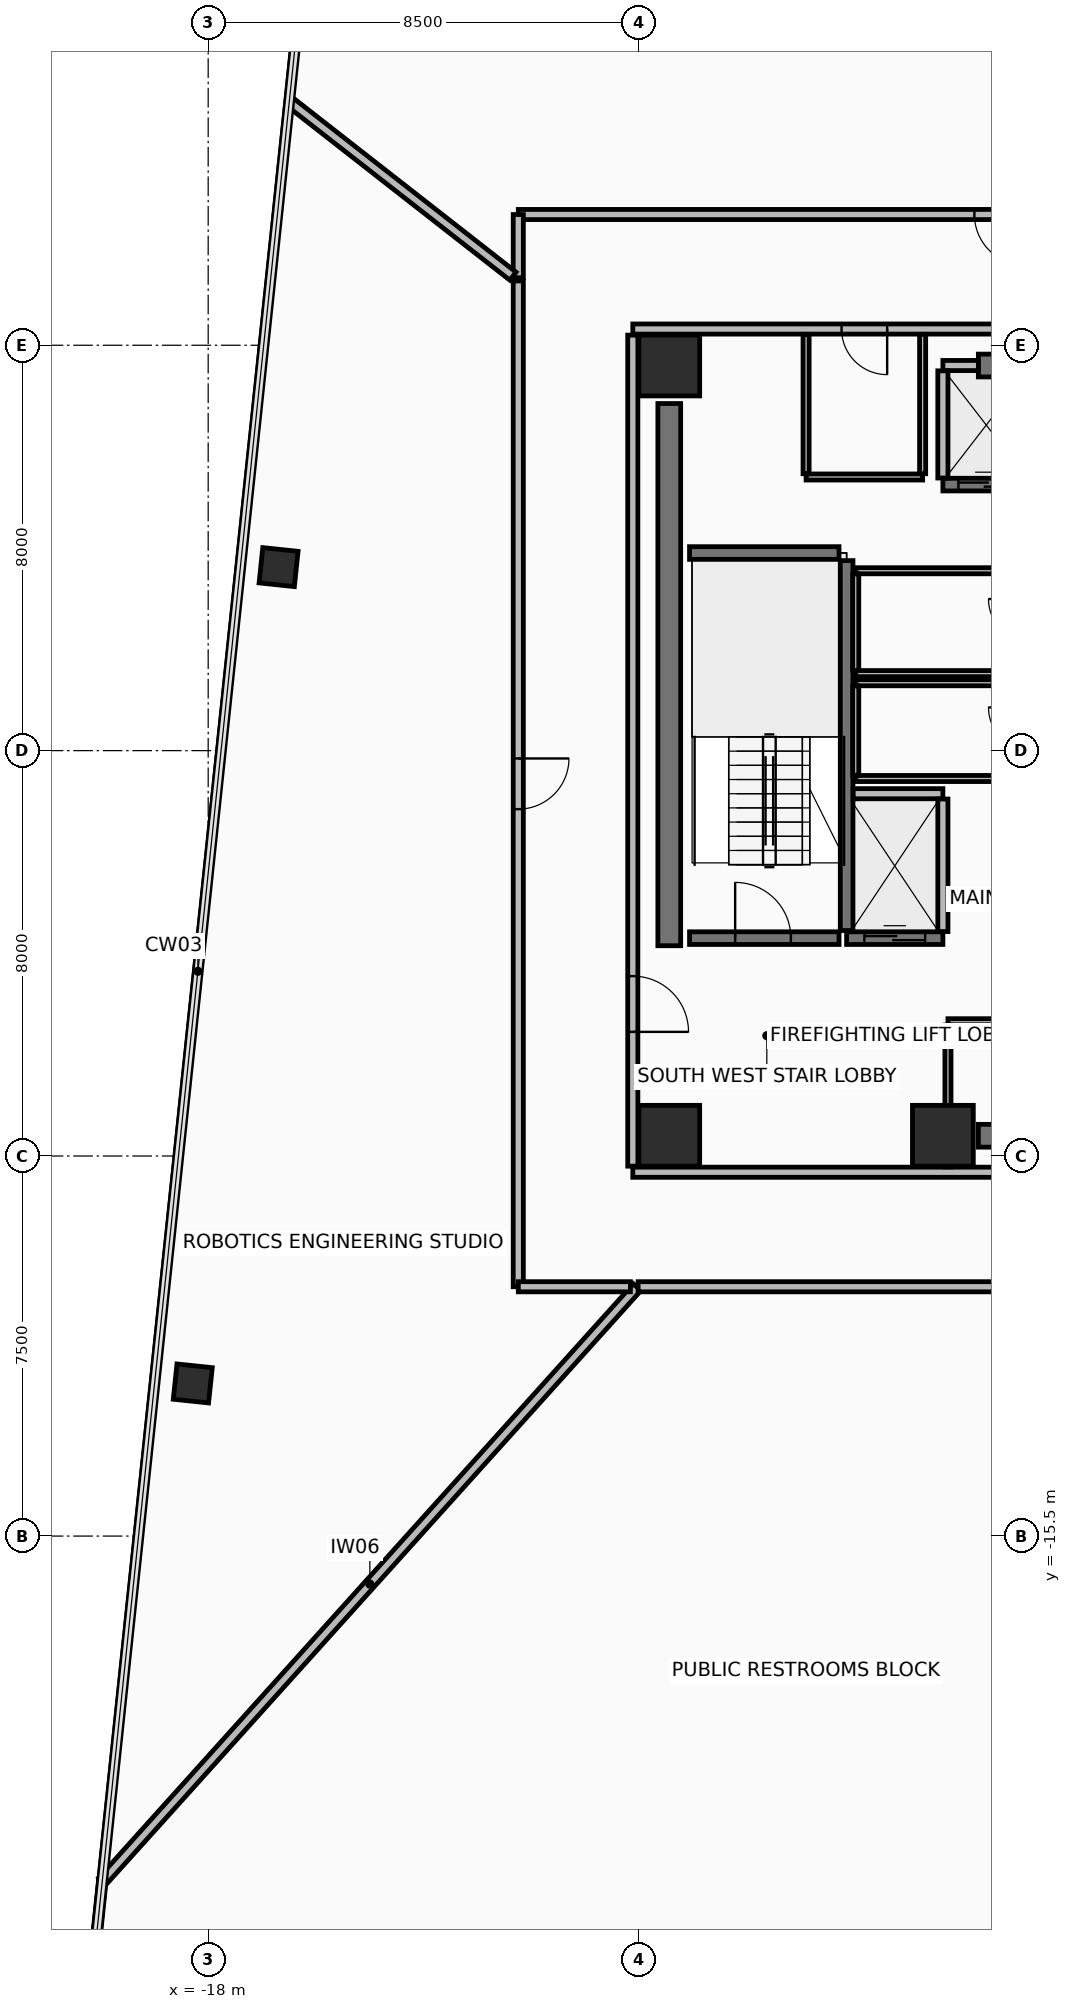
"""IFC4 building model, lengths in metres.
Left out: names, types, materials, properties, quantities, classifications, styles, units other than length and angle.
Written with IfcOpenShell. Run it as: python <this file> out.ifc"""

import sys

from ifc_helpers import new_model, si_unit, direction, frame, frame_2d, origin, origin_2d, place, context, subcontext, project, spatial, rectangle, hollow_rectangle, extrude, element, fill, save


model = new_model("IFC4")
c1 = context("Model", 3, precision=1e-05, world=origin(), true_north=direction((0.0, 1.0)))
c2 = subcontext(c1, "Body", "Model", "MODEL_VIEW")
j1 = project(units=[si_unit("LENGTHUNIT", "METRE"), si_unit("PLANEANGLEUNIT", "RADIAN")], contexts=[c1])
p1 = place(None, origin())
s1 = spatial("IfcSite", under=j1, at=p1, CompositionType="ELEMENT")
p2 = place(p1, origin())
s2 = spatial("IfcBuilding", under=s1, at=p2, CompositionType="ELEMENT")
p3 = place(p2, frame((0.0, 0.0, 123.25)))
s3 = spatial("IfcBuildingStorey", under=s2, at=p3, CompositionType="ELEMENT", Elevation=123.25)
for number, where, z_axis, x_axis in (
    (1, (-8.9, -7.6, 0.0), (0.0, 0.0, 1.0), (1.0, 0.0, 0.0)),
    (2, (-3.5, -7.6, 0.0), (0.0, 0.0, 1.0), (1.0, 0.0, 0.0)),
    (3, (-8.9, 7.6, 0.0), (0.0, 0.0, 1.0), (1.0, 0.0, 0.0)),
):
    element("IfcColumn", number, at=place(p3, frame(where, z_axis=z_axis, x_axis=x_axis)), inside=s3, PredefinedType="COLUMN", context=c2, shape_type="SweptSolid", body=[
        extrude(rectangle(XDim=1.2, YDim=1.2, at=origin_2d()), origin(), (0.0, 0.0, 1.0), 3.6),
    ])
for number, where, z_axis, x_axis in (
    (4, (-16.611, 3.622, 0.0), (0.0, 0.0, 1.0), (0.105, 0.995, 0.0)),
    (5, (-18.304, -12.488, 0.0), (0.0, 0.0, 1.0), (0.105, 0.995, 0.0)),
):
    element("IfcColumn", number, at=place(p3, frame(where, z_axis=z_axis, x_axis=x_axis)), inside=s3, PredefinedType="COLUMN", context=c2, shape_type="SweptSolid", body=[
        extrude(hollow_rectangle(XDim=0.7, YDim=0.7, WallThickness=0.04, at=origin_2d()), origin(), (0.0, 0.0, 1.0), 3.6),
    ])
for number, where, z_axis, x_axis in (
    (6, (-2.8, -7.6, 0.0), (0.0, 0.0, 1.0), (1.0, 0.0, 0.0)),
    (7, (-2.8, 7.6, 0.0), (0.0, 0.0, 1.0), (1.0, 0.0, 0.0)),
):
    element("IfcWall", number, at=place(p3, frame(where, z_axis=z_axis, x_axis=x_axis)), inside=s3, PredefinedType="SHEAR", context=c2, shape_type="SweptSolid", body=[
        extrude(rectangle(XDim=5.38, YDim=0.45, at=frame_2d((2.69, 0.0))), origin(), (0.0, 0.0, 1.0), 3.41),
    ])
p4 = place(p3, frame((-8.9, -3.85, 0.0), z_axis=(0.0, 0.0, 1.0), x_axis=(0.0, 1.0, 0.0)))
e8 = element("IfcWall", 8, at=p4, inside=s3, PredefinedType="SHEAR", context=c2, shape_type="SweptSolid", body=[
    extrude(rectangle(XDim=10.7, YDim=0.45, at=frame_2d((5.35, 0.0))), origin(), (0.0, 0.0, 1.0), 3.41),
])
p5 = place(p3, frame((-9.62, -8.32, 0.0), z_axis=(0.0, 0.0, 1.0), x_axis=(1.0, 0.0, 0.0)))
e9 = element("IfcWall", 9, at=p5, inside=s3, PredefinedType="PARTITIONING", context=c2, shape_type="SweptSolid", body=[
    extrude(rectangle(XDim=19.24, YDim=0.2, at=frame_2d((9.62, 0.0))), origin(), (0.0, 0.0, 1.0), 2.855),
])
p6 = place(p5, frame((8.57, 0.0, 0.0)))
e10 = element("IfcOpeningElement", 10, at=p6, cuts=e9, PredefinedType="OPENING", context=c2, shape_type="SweptSolid", body=[
    extrude(rectangle(XDim=0.9, YDim=2.1, at=frame_2d((0.45, 1.05))), frame((0.0, 0.11, 0.0), z_axis=(0.0, -1.0, 0.0), x_axis=(1.0, 0.0, 0.0)), (0.0, 0.0, 1.0), 0.22),
])
p7 = place(p5, frame((15.02, 0.0, 0.0)))
e11 = element("IfcOpeningElement", 11, at=p7, cuts=e9, PredefinedType="OPENING", context=c2, shape_type="SweptSolid", body=[
    extrude(rectangle(XDim=0.9, YDim=2.1, at=frame_2d((0.45, 1.05))), frame((0.0, 0.11, 0.0), z_axis=(0.0, -1.0, 0.0), x_axis=(1.0, 0.0, 0.0)), (0.0, 0.0, 1.0), 0.22),
])
p8 = place(p3, frame((9.62, 8.32, 0.0), z_axis=(0.0, 0.0, 1.0), x_axis=(-1.0, 0.0, 0.0)))
e12 = element("IfcWall", 12, at=p8, inside=s3, PredefinedType="PARTITIONING", context=c2, shape_type="SweptSolid", body=[
    extrude(rectangle(XDim=19.24, YDim=0.2, at=frame_2d((9.62, 0.0))), origin(), (0.0, 0.0, 1.0), 2.755),
])
p9 = place(p8, frame((14.22, 0.0, 0.0)))
e13 = element("IfcOpeningElement", 13, at=p9, cuts=e12, PredefinedType="OPENING", context=c2, shape_type="SweptSolid", body=[
    extrude(rectangle(XDim=0.9, YDim=2.1, at=frame_2d((0.45, 1.05))), frame((0.0, 0.11, 0.0), z_axis=(0.0, -1.0, 0.0), x_axis=(1.0, 0.0, 0.0)), (0.0, 0.0, 1.0), 0.22),
])
p10 = place(p3, frame((-9.62, 8.2, 0.0), z_axis=(0.0, 0.0, 1.0), x_axis=(0.0, -1.0, 0.0)))
e14 = element("IfcWall", 14, at=p10, inside=s3, PredefinedType="PARTITIONING", context=c2, shape_type="SweptSolid", body=[
    extrude(rectangle(XDim=16.4, YDim=0.2, at=frame_2d((8.2, 0.0))), origin(), (0.0, 0.0, 1.0), 2.855),
])
p11 = place(p10, frame((12.65, 0.0, 0.0)))
e15 = element("IfcOpeningElement", 15, at=p11, cuts=e14, PredefinedType="OPENING", context=c2, shape_type="SweptSolid", body=[
    extrude(rectangle(XDim=1.1, YDim=2.15, at=frame_2d((0.55, 1.075))), frame((0.0, 0.11, 0.0), z_axis=(0.0, -1.0, 0.0), x_axis=(1.0, 0.0, 0.0)), (0.0, 0.0, 1.0), 0.22),
])
p12 = place(p3, frame((-5.4, -3.55, 0.0), z_axis=(0.0, 0.0, 1.0), x_axis=(0.0, 1.0, 0.0)))
e16 = element("IfcWall", 16, at=p12, inside=s3, PredefinedType="SHEAR", context=c2, shape_type="SweptSolid", body=[
    extrude(rectangle(XDim=7.3, YDim=0.25, at=frame_2d((3.65, 0.0))), origin(), (0.0, 0.0, 1.0), 3.41),
])
p13 = place(p3, frame((-8.5, -3.7, 0.0), z_axis=(0.0, 0.0, 1.0), x_axis=(1.0, 0.0, 0.0)))
e17 = element("IfcWall", 17, at=p13, inside=s3, PredefinedType="SHEAR", context=c2, shape_type="SweptSolid", body=[
    extrude(rectangle(XDim=2.95, YDim=0.25, at=frame_2d((1.475, 0.0))), origin(), (0.0, 0.0, 1.0), 3.41),
])
p14 = place(p13, frame((0.9, 0.0, 0.0)))
e18 = element("IfcOpeningElement", 18, at=p14, cuts=e17, PredefinedType="OPENING", context=c2, shape_type="SweptSolid", body=[
    extrude(rectangle(XDim=1.1, YDim=2.15, at=frame_2d((0.55, 1.075))), frame((0.0, 0.135, 0.0), z_axis=(0.0, -1.0, 0.0), x_axis=(1.0, 0.0, 0.0)), (0.0, 0.0, 1.0), 0.27),
])
p15 = place(p3, frame((-8.5, 3.9, 0.0), z_axis=(0.0, 0.0, 1.0), x_axis=(1.0, 0.0, 0.0)))
e19 = element("IfcWall", 19, at=p15, inside=s3, PredefinedType="SHEAR", context=c2, shape_type="SweptSolid", body=[
    extrude(rectangle(XDim=2.95, YDim=0.25, at=frame_2d((1.475, 0.0))), origin(), (0.0, 0.0, 1.0), 3.41),
])
p16 = place(p3, frame((-3.5, 5.25, 0.0), z_axis=(0.0, 0.0, 1.0), x_axis=(1.0, 0.0, 0.0)))
e20 = element("IfcWall", 20, at=p16, inside=s3, PredefinedType="SHEAR", context=c2, shape_type="SweptSolid", body=[
    extrude(rectangle(XDim=1.712, YDim=0.25, at=frame_2d((0.856, 0.0))), origin(), (0.0, 0.0, 1.0), 3.41),
])
p17 = place(p16, frame((0.306, 0.0, 0.0)))
e21 = element("IfcOpeningElement", 21, at=p17, cuts=e20, PredefinedType="OPENING", context=c2, shape_type="SweptSolid", body=[
    extrude(rectangle(XDim=1.1, YDim=2.2, at=frame_2d((0.55, 1.1))), frame((0.0, 0.135, 0.0), z_axis=(0.0, -1.0, 0.0), x_axis=(1.0, 0.0, 0.0)), (0.0, 0.0, 1.0), 0.27),
])
p18 = place(p3, frame((-3.5, 7.6, 0.0), z_axis=(0.0, 0.0, 1.0), x_axis=(1.0, 0.0, 0.0)))
e22 = element("IfcWall", 22, at=p18, inside=s3, PredefinedType="PARTITIONING", context=c2, shape_type="SweptSolid", body=[
    extrude(rectangle(XDim=0.7, YDim=0.2, at=frame_2d((0.35, 0.0))), origin(), (0.0, 0.0, 1.0), 2.605),
])
p19 = place(p3, frame((-3.5, 5.38, 0.0), z_axis=(0.0, 0.0, 1.0), x_axis=(0.0, 1.0, 0.0)))
e23 = element("IfcWall", 23, at=p19, inside=s3, PredefinedType="PARTITIONING", context=c2, shape_type="SweptSolid", body=[
    extrude(rectangle(XDim=2.115, YDim=0.2, at=frame_2d((1.058, 0.0))), origin(), (0.0, 0.0, 1.0), 2.605),
])
p20 = place(p3, frame((-5.4, -3.7, 0.0), z_axis=(0.0, 0.0, 1.0), x_axis=(1.0, 0.0, 0.0)))
e24 = element("IfcWall", 24, at=p20, inside=s3, PredefinedType="SHEAR", context=c2, shape_type="SweptSolid", body=[
    extrude(rectangle(XDim=1.9, YDim=0.25, at=frame_2d((0.95, 0.0))), origin(), (0.0, 0.0, 1.0), 3.41),
])
p21 = place(p20, frame((0.35, 0.0, 0.0)))
e25 = element("IfcOpeningElement", 25, at=p21, cuts=e24, PredefinedType="OPENING", context=c2, shape_type="SweptSolid", body=[
    extrude(rectangle(XDim=1.2, YDim=2.2, at=frame_2d((0.6, 1.1))), frame((0.0, 0.135, 0.0), z_axis=(0.0, -1.0, 0.0), x_axis=(1.0, 0.0, 0.0)), (0.0, 0.0, 1.0), 0.27),
])
p22 = place(p3, frame((-5.27, -0.85, 0.0), z_axis=(0.0, 0.0, 1.0), x_axis=(1.0, 0.0, 0.0)))
e26 = element("IfcWall", 26, at=p22, inside=s3, PredefinedType="PARTITIONING", context=c2, shape_type="SweptSolid", body=[
    extrude(rectangle(XDim=1.77, YDim=0.2, at=frame_2d((0.885, 0.0))), origin(), (0.0, 0.0, 1.0), 3.41),
])
p23 = place(p3, frame((-3.5, -3.57, 0.0), z_axis=(0.0, 0.0, 1.0), x_axis=(0.0, 1.0, 0.0)))
e27 = element("IfcWall", 27, at=p23, inside=s3, PredefinedType="PARTITIONING", context=c2, shape_type="SweptSolid", body=[
    extrude(rectangle(XDim=2.615, YDim=0.2, at=frame_2d((1.308, 0.0))), origin(), (0.0, 0.0, 1.0), 3.41),
])
p24 = place(p3, frame((-5.22, 1.52, 0.0), z_axis=(0.0, 0.0, 1.0), x_axis=(1.0, 0.0, 0.0)))
e28 = element("IfcWall", 28, at=p24, inside=s3, PredefinedType="PARTITIONING", context=c2, shape_type="SweptSolid", body=[
    extrude(rectangle(XDim=3.47, YDim=0.12, at=frame_2d((1.735, 0.0))), origin(), (0.0, 0.0, 1.0), 3.41),
])
p25 = place(p3, frame((-1.815, 3.55, 0.0), z_axis=(0.0, 0.0, 1.0), x_axis=(-1.0, 0.0, 0.0)))
e29 = element("IfcWall", 29, at=p25, inside=s3, PredefinedType="PARTITIONING", context=c2, shape_type="SweptSolid", body=[
    extrude(rectangle(XDim=3.405, YDim=0.12, at=frame_2d((1.703, 0.0))), origin(), (0.0, 0.0, 1.0), 3.41),
])
p26 = place(p3, frame((-5.22, 3.485, 0.0), z_axis=(0.0, 0.0, 1.0), x_axis=(0.0, -1.0, 0.0)))
e30 = element("IfcWall", 30, at=p26, inside=s3, PredefinedType="PARTITIONING", context=c2, shape_type="SweptSolid", body=[
    extrude(rectangle(XDim=1.9, YDim=0.12, at=frame_2d((0.95, 0.0))), origin(), (0.0, 0.0, 1.0), 3.41),
])
p27 = place(p3, frame((-5.22, -0.55, 0.0), z_axis=(0.0, 0.0, 1.0), x_axis=(1.0, 0.0, 0.0)))
e31 = element("IfcWall", 31, at=p27, inside=s3, PredefinedType="PARTITIONING", context=c2, shape_type="SweptSolid", body=[
    extrude(rectangle(XDim=3.47, YDim=0.12, at=frame_2d((1.735, 0.0))), origin(), (0.0, 0.0, 1.0), 3.41),
])
p28 = place(p3, frame((-1.815, 1.34, 0.0), z_axis=(0.0, 0.0, 1.0), x_axis=(-1.0, 0.0, 0.0)))
e32 = element("IfcWall", 32, at=p28, inside=s3, PredefinedType="PARTITIONING", context=c2, shape_type="SweptSolid", body=[
    extrude(rectangle(XDim=3.405, YDim=0.12, at=frame_2d((1.703, 0.0))), origin(), (0.0, 0.0, 1.0), 3.41),
])
p29 = place(p3, frame((-5.22, 1.275, 0.0), z_axis=(0.0, 0.0, 1.0), x_axis=(0.0, -1.0, 0.0)))
e33 = element("IfcWall", 33, at=p29, inside=s3, PredefinedType="PARTITIONING", context=c2, shape_type="SweptSolid", body=[
    extrude(rectangle(XDim=1.76, YDim=0.12, at=frame_2d((0.88, 0.0))), origin(), (0.0, 0.0, 1.0), 3.41),
])
p30 = place(p3, frame((2.135, -5.35, 0.0), z_axis=(0.0, 0.0, 1.0), x_axis=(-1.0, 0.0, 0.0)))
e34 = element("IfcWall", 34, at=p30, inside=s3, PredefinedType="PARTITIONING", context=c2, shape_type="SweptSolid", body=[
    extrude(rectangle(XDim=5.535, YDim=0.12, at=frame_2d((2.768, 0.0))), origin(), (0.0, 0.0, 1.0), 2.605),
])
p31 = place(p3, frame((-3.4, -5.415, 0.0), z_axis=(0.0, 0.0, 1.0), x_axis=(0.0, -1.0, 0.0)))
e35 = element("IfcWall", 35, at=p31, inside=s3, PredefinedType="PARTITIONING", context=c2, shape_type="SweptSolid", body=[
    extrude(rectangle(XDim=2.8, YDim=0.12, at=frame_2d((1.4, 0.0))), origin(), (0.0, 0.0, 1.0), 2.605),
])
p32 = place(p3, frame((-6.2, 5.4, 0.0), z_axis=(0.0, 0.0, 1.0), x_axis=(1.0, 0.0, 0.0)))
e36 = element("IfcWall", 36, at=p32, inside=s3, PredefinedType="PARTITIONING", context=c2, shape_type="SweptSolid", body=[
    extrude(rectangle(XDim=2.3, YDim=0.12, at=frame_2d((1.15, 0.0))), origin(), (0.0, 0.0, 1.0), 3.41),
])
for number, where, z_axis, x_axis in (
    (37, (-3.9, 5.465, 0.0), (0.0, 0.0, 1.0), (0.0, 1.0, 0.0)),
    (38, (-6.2, 8.215, 0.0), (0.0, 0.0, 1.0), (0.0, -1.0, 0.0)),
):
    element("IfcWall", number, at=place(p3, frame(where, z_axis=z_axis, x_axis=x_axis)), inside=s3, PredefinedType="PARTITIONING", context=c2, shape_type="SweptSolid", body=[
        extrude(rectangle(XDim=2.75, YDim=0.12, at=frame_2d((1.375, 0.0))), origin(), (0.0, 0.0, 1.0), 2.605),
    ])
p33 = place(p3, frame((-20.86, -29.633, 0.0), z_axis=(0.0, 0.0, 1.0), x_axis=(0.104558609425, 0.994518726418, 0.0)))
e39 = element("IfcWall", 39, at=p33, inside=s3, PredefinedType="PARTITIONING", context=c2, shape_type="SweptSolid", body=[
    extrude(rectangle(XDim=7.353, YDim=0.15, at=frame_2d((3.676, 0.0))), origin(), (0.0, 0.0, 1.0), 3.41),
])
p34 = place(p3, frame((-20.085, -22.307, 0.0), z_axis=(0.0, 0.0, 1.0), x_axis=(0.66913493522, 0.743140927731, 0.0)))
e40 = element("IfcWall", 40, at=p34, inside=s3, PredefinedType="PARTITIONING", context=c2, shape_type="SweptSolid", body=[
    extrude(rectangle(XDim=15.769, YDim=0.2, at=frame_2d((7.884, 0.0))), origin(), (0.0, 0.0, 1.0), 2.705),
])
p35 = place(p3, frame((-9.515, -10.58, 0.0), z_axis=(0.0, 0.0, 1.0), x_axis=(1.0, 0.0, 0.0)))
e41 = element("IfcWall", 41, at=p35, inside=s3, PredefinedType="PARTITIONING", context=c2, shape_type="SweptSolid", body=[
    extrude(rectangle(XDim=19.721, YDim=0.2, at=frame_2d((9.861, 0.0))), origin(), (0.0, 0.0, 1.0), 2.855),
])
p36 = place(p35, frame((9.436, 0.0, 0.0)))
e42 = element("IfcOpeningElement", 42, at=p36, cuts=e41, PredefinedType="OPENING", context=c2, shape_type="SweptSolid", body=[
    extrude(rectangle(XDim=0.85, YDim=2.1, at=frame_2d((0.425, 1.05))), frame((0.0, 0.11, 0.0), z_axis=(0.0, -1.0, 0.0), x_axis=(1.0, 0.0, 0.0)), (0.0, 0.0, 1.0), 0.22),
])
p37 = place(p3, frame((16.557, -17.296, 0.0), z_axis=(0.0, 0.0, 1.0), x_axis=(-0.913544936997, -0.406737812464, 0.0)))
e43 = element("IfcWall", 43, at=p37, inside=s3, PredefinedType="PARTITIONING", context=c2, shape_type="SweptSolid", body=[
    extrude(rectangle(XDim=36.92, YDim=0.15, at=frame_2d((18.46, 0.0))), origin(), (0.0, 0.0, 1.0), 3.41),
])
p38 = place(p3, frame((7.123, 10.58, 0.0), z_axis=(0.0, 0.0, 1.0), x_axis=(-1.0, 0.0, 0.0)))
e44 = element("IfcWall", 44, at=p38, inside=s3, PredefinedType="PARTITIONING", context=c2, shape_type="SweptSolid", body=[
    extrude(rectangle(XDim=19.002, YDim=0.2, at=frame_2d((9.501, 0.0))), origin(), (0.0, 0.0, 1.0), 2.755),
])
p39 = place(p38, frame((9.001, 0.0, 0.0)))
e45 = element("IfcOpeningElement", 45, at=p39, cuts=e44, PredefinedType="OPENING", context=c2, shape_type="SweptSolid", body=[
    extrude(rectangle(XDim=1.0, YDim=2.15, at=frame_2d((0.5, 1.075))), frame((0.0, 0.11, 0.0), z_axis=(0.0, -1.0, 0.0), x_axis=(1.0, 0.0, 0.0)), (0.0, 0.0, 1.0), 0.22),
])
p40 = place(p3, frame((-11.88, 10.579, 0.0), z_axis=(0.0, 0.0, 1.0), x_axis=(0.0, -1.0, 0.0)))
e46 = element("IfcWall", 46, at=p40, inside=s3, PredefinedType="PARTITIONING", context=c2, shape_type="SweptSolid", body=[
    extrude(rectangle(XDim=1.246, YDim=0.2, at=frame_2d((0.623, 0.0))), origin(), (0.0, 0.0, 1.0), 3.045),
])
p41 = place(p3, frame((-11.985, 9.364, 0.0), z_axis=(0.0, 0.0, 1.0), x_axis=(-0.788004499682, 0.6156694799, 0.0)))
e47 = element("IfcWall", 47, at=p41, inside=s3, PredefinedType="PARTITIONING", context=c2, shape_type="SweptSolid", body=[
    extrude(rectangle(XDim=5.587, YDim=0.2, at=frame_2d((2.794, 0.0))), origin(), (0.0, 0.0, 1.0), 2.705),
])
p42 = place(p3, frame((-11.88, 9.27, 0.0), z_axis=(0.0, 0.0, 1.0), x_axis=(0.0, -1.0, 0.0)))
e48 = element("IfcWall", 48, at=p42, inside=s3, PredefinedType="PARTITIONING", context=c2, shape_type="SweptSolid", body=[
    extrude(rectangle(XDim=19.849, YDim=0.2, at=frame_2d((9.924, 0.0))), origin(), (0.0, 0.0, 1.0), 2.855),
])
p43 = place(p42, frame((9.424, 0.0, 0.0)))
e49 = element("IfcOpeningElement", 49, at=p43, cuts=e48, PredefinedType="OPENING", context=c2, shape_type="SweptSolid", body=[
    extrude(rectangle(XDim=1.0, YDim=2.15, at=frame_2d((0.5, 1.075))), frame((0.0, 0.11, 0.0), z_axis=(0.0, -1.0, 0.0), x_axis=(1.0, 0.0, 0.0)), (0.0, 0.0, 1.0), 0.22),
])
p44 = place(p3, frame((-11.879, -10.58, 0.0), z_axis=(0.0, 0.0, 1.0), x_axis=(1.0, 0.0, 0.0)))
e50 = element("IfcWall", 50, at=p44, inside=s3, PredefinedType="PARTITIONING", context=c2, shape_type="SweptSolid", body=[
    extrude(rectangle(XDim=2.212, YDim=0.2, at=frame_2d((1.106, 0.0))), origin(), (0.0, 0.0, 1.0), 2.855),
])
p45 = place(p11, frame((1.1, 0.0, 0.0), z_axis=(0.0, 0.0, 1.0), x_axis=(-1.0, 0.0, 0.0)))
e51 = element("IfcDoor", 51, at=p45, inside=s3, OperationType="SINGLE_SWING_LEFT", PredefinedType="DOOR", context=c2, shape_type="SweptSolid", body=[
    extrude(rectangle(XDim=1.1, YDim=2.15, at=frame_2d((0.55, 1.075))), frame((0.0, 0.025, 0.0), z_axis=(0.0, -1.0, 0.0), x_axis=(1.0, 0.0, 0.0)), (0.0, 0.0, 1.0), 0.05),
])
fill(e15, e51)
p46 = place(p14, origin())
e52 = element("IfcDoor", 52, at=p46, inside=s3, OperationType="SINGLE_SWING_LEFT", PredefinedType="DOOR", context=c2, shape_type="SweptSolid", body=[
    extrude(rectangle(XDim=1.1, YDim=2.15, at=frame_2d((0.55, 1.075))), frame((0.0, 0.025, 0.0), z_axis=(0.0, -1.0, 0.0), x_axis=(1.0, 0.0, 0.0)), (0.0, 0.0, 1.0), 0.05),
])
fill(e18, e52)
p47 = place(p17, origin())
e53 = element("IfcDoor", 53, at=p47, inside=s3, OperationType="SLIDING_TO_LEFT", PredefinedType="DOOR", context=c2, shape_type="SweptSolid", body=[
    extrude(rectangle(XDim=1.1, YDim=2.2, at=frame_2d((0.55, 1.1))), frame((0.0, 0.025, 0.0), z_axis=(0.0, -1.0, 0.0), x_axis=(1.0, 0.0, 0.0)), (0.0, 0.0, 1.0), 0.05),
])
fill(e21, e53)
p48 = place(p21, origin())
e54 = element("IfcDoor", 54, at=p48, inside=s3, OperationType="SLIDING_TO_RIGHT", PredefinedType="DOOR", context=c2, shape_type="SweptSolid", body=[
    extrude(rectangle(XDim=1.2, YDim=2.2, at=frame_2d((0.6, 1.1))), frame((0.0, 0.025, 0.0), z_axis=(0.0, -1.0, 0.0), x_axis=(1.0, 0.0, 0.0)), (0.0, 0.0, 1.0), 0.05),
])
fill(e25, e54)
p49 = place(p9, origin())
e55 = element("IfcDoor", 55, at=p49, inside=s3, OperationType="SINGLE_SWING_LEFT", PredefinedType="DOOR", context=c2, shape_type="SweptSolid", body=[
    extrude(rectangle(XDim=0.9, YDim=2.1, at=frame_2d((0.45, 1.05))), frame((0.0, 0.025, 0.0), z_axis=(0.0, -1.0, 0.0), x_axis=(1.0, 0.0, 0.0)), (0.0, 0.0, 1.0), 0.05),
])
fill(e13, e55)
p50 = place(p39, origin())
e56 = element("IfcDoor", 56, at=p50, inside=s3, OperationType="SINGLE_SWING_RIGHT", PredefinedType="DOOR", context=c2, shape_type="SweptSolid", body=[
    extrude(rectangle(XDim=1.0, YDim=2.15, at=frame_2d((0.5, 1.075))), frame((0.0, 0.025, 0.0), z_axis=(0.0, -1.0, 0.0), x_axis=(1.0, 0.0, 0.0)), (0.0, 0.0, 1.0), 0.05),
])
fill(e45, e56)
p51 = place(p43, origin())
e57 = element("IfcDoor", 57, at=p51, inside=s3, OperationType="SINGLE_SWING_RIGHT", PredefinedType="DOOR", context=c2, shape_type="SweptSolid", body=[
    extrude(rectangle(XDim=1.0, YDim=2.15, at=frame_2d((0.5, 1.075))), frame((0.0, 0.025, 0.0), z_axis=(0.0, -1.0, 0.0), x_axis=(1.0, 0.0, 0.0)), (0.0, 0.0, 1.0), 0.05),
])
fill(e49, e57)
save(model, sys.argv[1])
